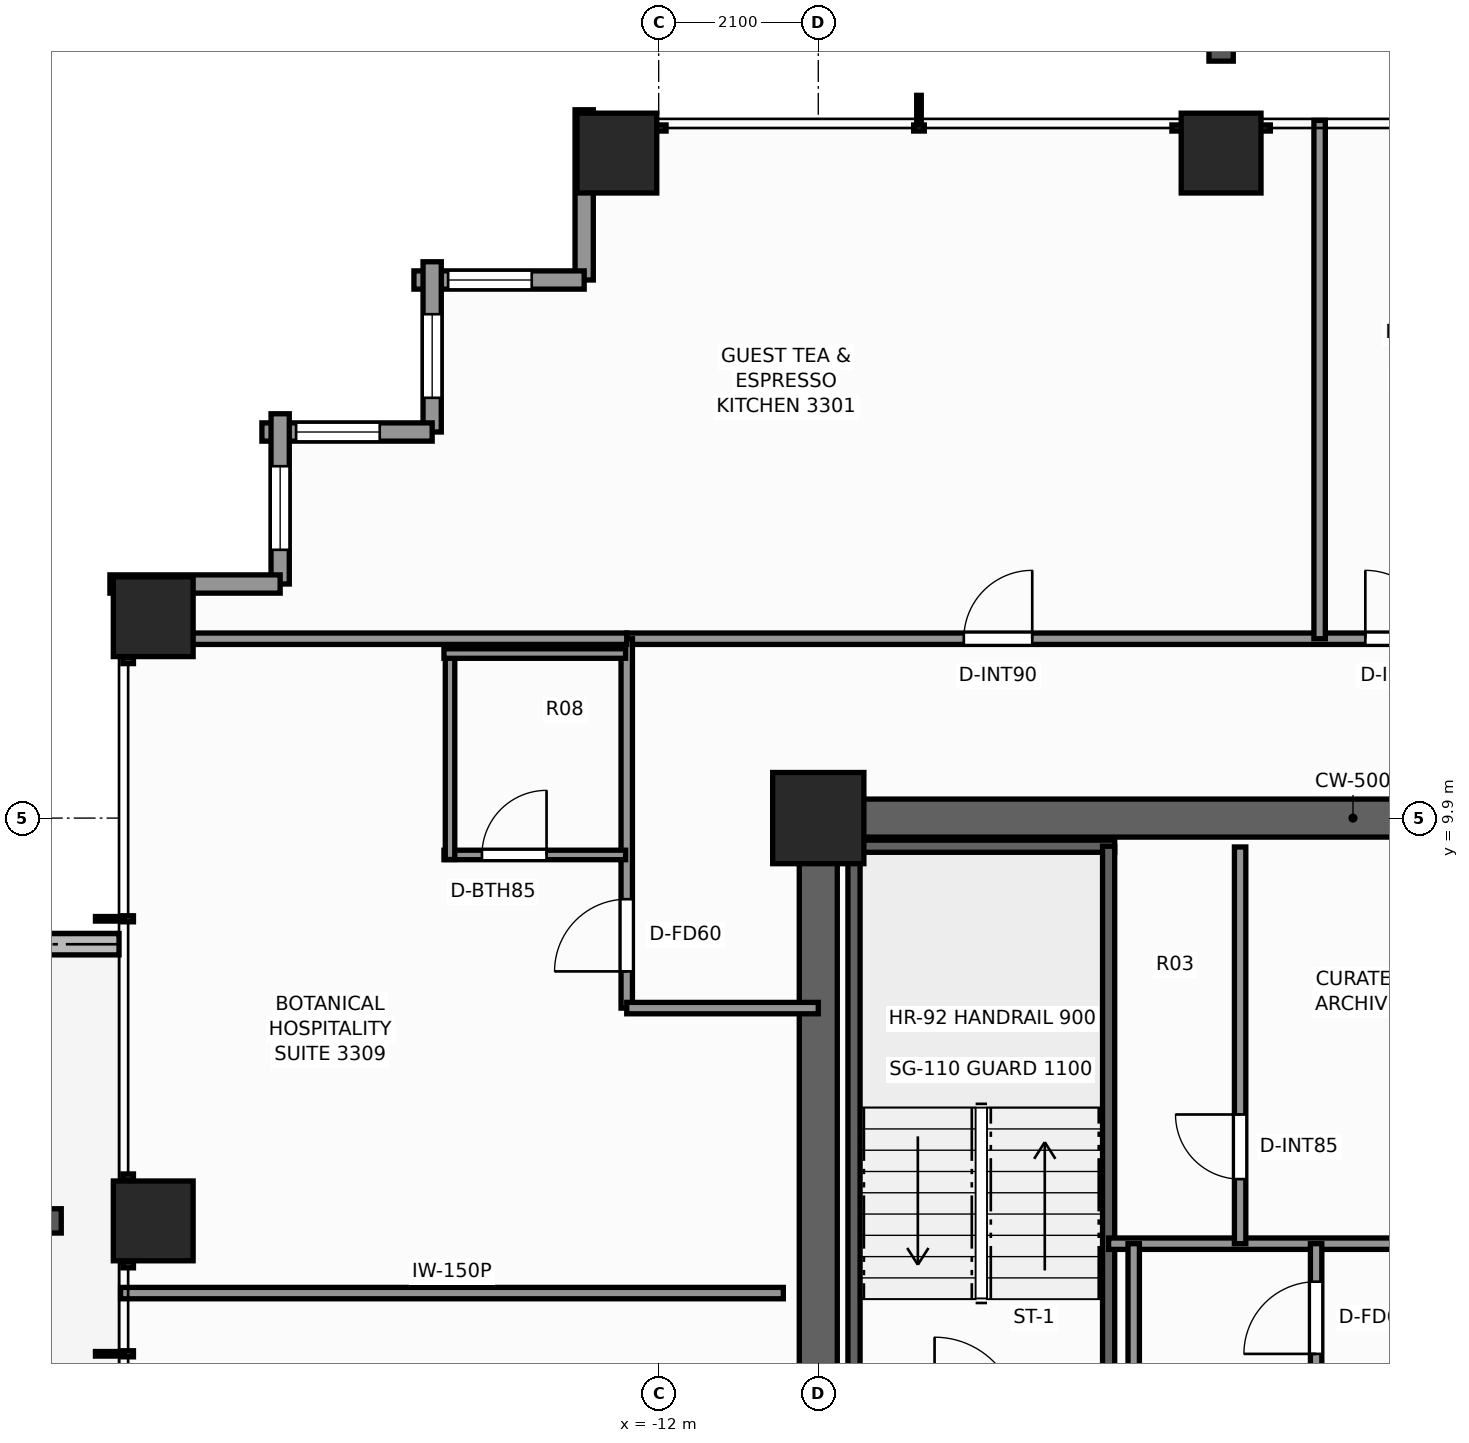
"""IFC4 building model, lengths in metres.
Left out: names, types, materials, properties, quantities, classifications, styles, units other than length and angle.
Written with IfcOpenShell. Run it as: python <this file> out.ifc"""

import sys

from ifc_helpers import new_model, si_unit, direction, frame, frame_2d, origin, origin_2d, place, context, subcontext, project, spatial, rectangle, extrude, element, fill, save


model = new_model("IFC4")
c1 = context("Model", 3, precision=1e-05, world=origin(), true_north=direction((0.0, 1.0)))
c2 = subcontext(c1, "Body", "Model", "MODEL_VIEW")
j1 = project(units=[si_unit("LENGTHUNIT", "METRE"), si_unit("PLANEANGLEUNIT", "RADIAN")], contexts=[c1])
p1 = place(None, origin())
s1 = spatial("IfcSite", under=j1, at=p1, CompositionType="ELEMENT")
p2 = place(p1, origin())
s2 = spatial("IfcBuilding", under=s1, at=p2, CompositionType="ELEMENT")
p3 = place(p2, frame((0.0, 0.0, 115.1)))
s3 = spatial("IfcBuildingStorey", under=s2, at=p3, CompositionType="ELEMENT", Elevation=115.1)
p4 = place(p3, frame((-10.15, 9.9, 0.0), z_axis=(0.0, 0.0, 1.0), x_axis=(1.0, 0.0, 0.0)))
e1 = element("IfcWall", 1, at=p4, inside=s3, PredefinedType="SHEAR", context=c2, shape_type="SweptSolid", body=[
    extrude(rectangle(XDim=14.57, YDim=0.5, at=frame_2d((7.285, 0.0))), origin(), (0.0, 0.0, 1.0), 3.3),
])
p5 = place(p3, frame((-9.9, -3.7, 0.0), z_axis=(0.0, 0.0, 1.0), x_axis=(0.0, 1.0, 0.0)))
e2 = element("IfcWall", 2, at=p5, inside=s3, PredefinedType="SHEAR", context=c2, shape_type="SweptSolid", body=[
    extrude(rectangle(XDim=13.35, YDim=0.5, at=frame_2d((6.675, 0.0))), origin(), (0.0, 0.0, 1.0), 3.3),
])
p6 = place(p5, frame((0.35, 0.0, 0.0)))
e3 = element("IfcOpeningElement", 3, at=p6, cuts=e2, PredefinedType="OPENING", context=c2, shape_type="SweptSolid", body=[
    extrude(rectangle(XDim=1.1, YDim=2.2, at=frame_2d((0.55, 1.1))), frame((0.0, 0.26, 0.0), z_axis=(0.0, -1.0, 0.0), x_axis=(1.0, 0.0, 0.0)), (0.0, 0.0, 1.0), 0.52),
])
p7 = place(p3, frame((-9.9, 9.9, 0.0), z_axis=(0.0, 0.0, 1.0), x_axis=(1.0, 0.0, 0.0)))
e4 = element("IfcColumn", 4, at=p7, inside=s3, PredefinedType="COLUMN", context=c2, shape_type="SweptSolid", body=[
    extrude(rectangle(XDim=1.2, YDim=1.2, at=origin_2d()), origin(), (0.0, 0.0, 1.0), 3.3),
])
for number, where, z_axis, x_axis in (
    (5, (-12.55, 18.65, 0.0), (0.0, 0.0, 1.0), (1.0, 0.0, 0.0)),
    (6, (-4.6, 18.65, 0.0), (0.0, 0.0, 1.0), (1.0, 0.0, 0.0)),
    (7, (-18.65, 4.6, 0.0), (0.0, 0.0, 1.0), (1.0, 0.0, 0.0)),
    (8, (-18.65, 12.55, 0.0), (0.0, 0.0, 1.0), (1.0, 0.0, 0.0)),
):
    element("IfcColumn", number, at=place(p3, frame(where, z_axis=z_axis, x_axis=x_axis)), inside=s3, PredefinedType="COLUMN", context=c2, shape_type="SweptSolid", body=[
        extrude(rectangle(XDim=1.05, YDim=1.05, at=origin_2d()), origin(), (0.0, 0.0, 1.0), 3.3),
    ])
p8 = place(p3, frame((-19.1, 8.24, -0.04), z_axis=(0.0, 0.0, 1.0), x_axis=(-1.0, 0.0, 0.0)))
e9 = element("IfcWall", 9, at=p8, inside=s3, PredefinedType="PARAPET", context=c2, shape_type="SweptSolid", body=[
    extrude(rectangle(XDim=3.214, YDim=0.28, at=frame_2d((1.607, 0.0))), origin(), (0.0, 0.0, 1.0), 0.42),
])
p9 = place(p3, frame((-12.98, 16.98, 0.0), z_axis=(0.0, 0.0, 1.0), x_axis=(0.0, 1.0, 0.0)))
e10 = element("IfcWall", 10, at=p9, inside=s3, PredefinedType="STANDARD", context=c2, shape_type="SweptSolid", body=[
    extrude(rectangle(XDim=2.24, YDim=0.24, at=frame_2d((1.12, 0.0))), origin(), (0.0, 0.0, 1.0), 2.459),
])
p10 = place(p3, frame((-15.22, 16.98, 0.0), z_axis=(0.0, 0.0, 1.0), x_axis=(1.0, 0.0, 0.0)))
e11 = element("IfcWall", 11, at=p10, inside=s3, PredefinedType="STANDARD", context=c2, shape_type="SweptSolid", body=[
    extrude(rectangle(XDim=2.24, YDim=0.24, at=frame_2d((1.12, 0.0))), origin(), (0.0, 0.0, 1.0), 2.459),
])
p11 = place(p10, frame((0.45, 0.0, 0.65)))
e12 = element("IfcOpeningElement", 12, at=p11, cuts=e11, PredefinedType="OPENING", context=c2, shape_type="SweptSolid", body=[
    extrude(rectangle(XDim=1.1, YDim=1.45, at=frame_2d((0.55, 0.725))), frame((0.0, 0.13, 0.0), z_axis=(0.0, -1.0, 0.0), x_axis=(1.0, 0.0, 0.0)), (0.0, 0.0, 1.0), 0.26),
])
p12 = place(p3, frame((-14.98, 14.98, 0.0), z_axis=(0.0, 0.0, 1.0), x_axis=(0.0, 1.0, 0.0)))
e13 = element("IfcWall", 13, at=p12, inside=s3, PredefinedType="STANDARD", context=c2, shape_type="SweptSolid", body=[
    extrude(rectangle(XDim=2.24, YDim=0.24, at=frame_2d((1.12, 0.0))), origin(), (0.0, 0.0, 1.0), 2.459),
])
p13 = place(p12, frame((0.45, 0.0, 0.65)))
e14 = element("IfcOpeningElement", 14, at=p13, cuts=e13, PredefinedType="OPENING", context=c2, shape_type="SweptSolid", body=[
    extrude(rectangle(XDim=1.1, YDim=1.45, at=frame_2d((0.55, 0.725))), frame((0.0, 0.13, 0.0), z_axis=(0.0, -1.0, 0.0), x_axis=(1.0, 0.0, 0.0)), (0.0, 0.0, 1.0), 0.26),
])
p14 = place(p3, frame((-17.22, 14.98, 0.0), z_axis=(0.0, 0.0, 1.0), x_axis=(1.0, 0.0, 0.0)))
e15 = element("IfcWall", 15, at=p14, inside=s3, PredefinedType="STANDARD", context=c2, shape_type="SweptSolid", body=[
    extrude(rectangle(XDim=2.24, YDim=0.24, at=frame_2d((1.12, 0.0))), origin(), (0.0, 0.0, 1.0), 2.459),
])
p15 = place(p14, frame((0.45, 0.0, 0.65)))
e16 = element("IfcOpeningElement", 16, at=p15, cuts=e15, PredefinedType="OPENING", context=c2, shape_type="SweptSolid", body=[
    extrude(rectangle(XDim=1.1, YDim=1.45, at=frame_2d((0.55, 0.725))), frame((0.0, 0.13, 0.0), z_axis=(0.0, -1.0, 0.0), x_axis=(1.0, 0.0, 0.0)), (0.0, 0.0, 1.0), 0.26),
])
p16 = place(p3, frame((-16.98, 12.98, 0.0), z_axis=(0.0, 0.0, 1.0), x_axis=(0.0, 1.0, 0.0)))
e17 = element("IfcWall", 17, at=p16, inside=s3, PredefinedType="STANDARD", context=c2, shape_type="SweptSolid", body=[
    extrude(rectangle(XDim=2.24, YDim=0.24, at=frame_2d((1.12, 0.0))), origin(), (0.0, 0.0, 1.0), 2.459),
])
p17 = place(p16, frame((0.45, 0.0, 0.65)))
e18 = element("IfcOpeningElement", 18, at=p17, cuts=e17, PredefinedType="OPENING", context=c2, shape_type="SweptSolid", body=[
    extrude(rectangle(XDim=1.1, YDim=1.45, at=frame_2d((0.55, 0.725))), frame((0.0, 0.13, 0.0), z_axis=(0.0, -1.0, 0.0), x_axis=(1.0, 0.0, 0.0)), (0.0, 0.0, 1.0), 0.26),
])
p18 = place(p3, frame((-19.22, 12.98, 0.0), z_axis=(0.0, 0.0, 1.0), x_axis=(1.0, 0.0, 0.0)))
e19 = element("IfcWall", 19, at=p18, inside=s3, PredefinedType="STANDARD", context=c2, shape_type="SweptSolid", body=[
    extrude(rectangle(XDim=2.24, YDim=0.24, at=frame_2d((1.12, 0.0))), origin(), (0.0, 0.0, 1.0), 2.459),
])
p19 = place(p3, frame((-9.52, 9.53, 0.0), z_axis=(0.0, 0.0, 1.0), x_axis=(1.0, 0.0, 0.0)))
e20 = element("IfcWall", 20, at=p19, inside=s3, PredefinedType="SHEAR", context=c2, shape_type="SweptSolid", body=[
    extrude(rectangle(XDim=3.52, YDim=0.16, at=frame_2d((1.76, 0.0))), origin(), (0.0, 0.0, 1.0), 3.3),
])
for number, where, z_axis, x_axis in (
    (21, (-9.43, 1.97, 0.0), (0.0, 0.0, 1.0), (0.0, 1.0, 0.0)),
    (22, (-6.08, 1.97, 0.0), (0.0, 0.0, 1.0), (0.0, 1.0, 0.0)),
):
    element("IfcWall", number, at=place(p3, frame(where, z_axis=z_axis, x_axis=x_axis)), inside=s3, PredefinedType="SHEAR", context=c2, shape_type="SweptSolid", body=[
        extrude(rectangle(XDim=7.56, YDim=0.16, at=frame_2d((3.78, 0.0))), origin(), (0.0, 0.0, 1.0), 3.3),
    ])
p20 = place(p3, frame((-6.08, 4.3, 0.0), z_axis=(0.0, 0.0, 1.0), x_axis=(1.0, 0.0, 0.0)))
e23 = element("IfcWall", 23, at=p20, inside=s3, PredefinedType="PARTITIONING", context=c2, shape_type="SweptSolid", body=[
    extrude(rectangle(XDim=6.3, YDim=0.15, at=frame_2d((3.15, 0.0))), origin(), (0.0, 0.0, 1.0), 3.08),
])
p21 = place(p3, frame((-4.35, 4.3, 0.0), z_axis=(0.0, 0.0, 1.0), x_axis=(0.0, 1.0, 0.0)))
e24 = element("IfcWall", 24, at=p21, inside=s3, PredefinedType="PARTITIONING", context=c2, shape_type="SweptSolid", body=[
    extrude(rectangle(XDim=5.22, YDim=0.15, at=frame_2d((2.61, 0.0))), origin(), (0.0, 0.0, 1.0), 3.08),
])
p22 = place(p21, frame((0.85, 0.0, 0.0)))
e25 = element("IfcOpeningElement", 25, at=p22, cuts=e24, PredefinedType="OPENING", context=c2, shape_type="SweptSolid", body=[
    extrude(rectangle(XDim=0.85, YDim=2.03, at=frame_2d((0.425, 1.015))), frame((0.0, 0.085, 0.0), z_axis=(0.0, -1.0, 0.0), x_axis=(1.0, 0.0, 0.0)), (0.0, 0.0, 1.0), 0.17),
])
p23 = place(p3, frame((-3.35, 1.1, 0.0), z_axis=(0.0, 0.0, 1.0), x_axis=(0.0, 1.0, 0.0)))
e26 = element("IfcWall", 26, at=p23, inside=s3, PredefinedType="PARTITIONING", context=c2, shape_type="SweptSolid", body=[
    extrude(rectangle(XDim=3.2, YDim=0.15, at=frame_2d((1.6, 0.0))), origin(), (0.0, 0.0, 1.0), 2.715),
])
p24 = place(p23, frame((1.75, 0.0, 0.0)))
e27 = element("IfcOpeningElement", 27, at=p24, cuts=e26, PredefinedType="OPENING", context=c2, shape_type="SweptSolid", body=[
    extrude(rectangle(XDim=0.95, YDim=2.06, at=frame_2d((0.475, 1.03))), frame((0.0, 0.085, 0.0), z_axis=(0.0, -1.0, 0.0), x_axis=(1.0, 0.0, 0.0)), (0.0, 0.0, 1.0), 0.17),
])
p25 = place(p3, frame((-5.75, 1.97, 0.0), z_axis=(0.0, 0.0, 1.0), x_axis=(0.0, 1.0, 0.0)))
e28 = element("IfcWall", 28, at=p25, inside=s3, PredefinedType="PARTITIONING", context=c2, shape_type="SweptSolid", body=[
    extrude(rectangle(XDim=2.33, YDim=0.15, at=frame_2d((1.165, 0.0))), origin(), (0.0, 0.0, 1.0), 2.715),
])
p26 = place(p3, frame((-12.42, 12.26, 0.0), z_axis=(0.0, 0.0, 1.0), x_axis=(1.0, 0.0, 0.0)))
e29 = element("IfcWall", 29, at=p26, inside=s3, PredefinedType="PARTITIONING", context=c2, shape_type="SweptSolid", body=[
    extrude(rectangle(XDim=24.68, YDim=0.15, at=frame_2d((12.34, 0.0))), origin(), (0.0, 0.0, 1.0), 2.292),
])
p27 = place(p26, frame((4.435, 0.0, 0.0)))
e30 = element("IfcOpeningElement", 30, at=p27, cuts=e29, PredefinedType="OPENING", context=c2, shape_type="SweptSolid", body=[
    extrude(rectangle(XDim=0.9, YDim=2.06, at=frame_2d((0.45, 1.03))), frame((0.0, 0.085, 0.0), z_axis=(0.0, -1.0, 0.0), x_axis=(1.0, 0.0, 0.0)), (0.0, 0.0, 1.0), 0.17),
])
p28 = place(p26, frame((9.718, 0.0, 0.0)))
e31 = element("IfcOpeningElement", 31, at=p28, cuts=e29, PredefinedType="OPENING", context=c2, shape_type="SweptSolid", body=[
    extrude(rectangle(XDim=0.9, YDim=2.06, at=frame_2d((0.45, 1.03))), frame((0.0, 0.085, 0.0), z_axis=(0.0, -1.0, 0.0), x_axis=(1.0, 0.0, 0.0)), (0.0, 0.0, 1.0), 0.17),
])
p29 = place(p26, frame((13.516, 0.0, 0.0)))
e32 = element("IfcOpeningElement", 32, at=p29, cuts=e29, PredefinedType="OPENING", context=c2, shape_type="SweptSolid", body=[
    extrude(rectangle(XDim=0.95, YDim=2.06, at=frame_2d((0.475, 1.03))), frame((0.0, 0.085, 0.0), z_axis=(0.0, -1.0, 0.0), x_axis=(1.0, 0.0, 0.0)), (0.0, 0.0, 1.0), 0.17),
])
p30 = place(p26, frame((18.772, 0.0, 0.0)))
e33 = element("IfcOpeningElement", 33, at=p30, cuts=e29, PredefinedType="OPENING", context=c2, shape_type="SweptSolid", body=[
    extrude(rectangle(XDim=0.9, YDim=2.06, at=frame_2d((0.45, 1.03))), frame((0.0, 0.085, 0.0), z_axis=(0.0, -1.0, 0.0), x_axis=(1.0, 0.0, 0.0)), (0.0, 0.0, 1.0), 0.17),
])
p31 = place(p26, frame((21.107, 0.0, 0.0)))
e34 = element("IfcOpeningElement", 34, at=p31, cuts=e29, PredefinedType="OPENING", context=c2, shape_type="SweptSolid", body=[
    extrude(rectangle(XDim=0.9, YDim=2.06, at=frame_2d((0.45, 1.03))), frame((0.0, 0.085, 0.0), z_axis=(0.0, -1.0, 0.0), x_axis=(1.0, 0.0, 0.0)), (0.0, 0.0, 1.0), 0.17),
])
p32 = place(p3, frame((-12.42, 7.4, 0.0), z_axis=(0.0, 0.0, 1.0), x_axis=(0.0, 1.0, 0.0)))
e35 = element("IfcWall", 35, at=p32, inside=s3, PredefinedType="PARTITIONING", context=c2, shape_type="SweptSolid", body=[
    extrude(rectangle(XDim=4.86, YDim=0.15, at=frame_2d((2.43, 0.0))), origin(), (0.0, 0.0, 1.0), 2.292),
])
p33 = place(p32, frame((0.483, 0.0, 0.0)))
e36 = element("IfcOpeningElement", 36, at=p33, cuts=e35, PredefinedType="OPENING", context=c2, shape_type="SweptSolid", body=[
    extrude(rectangle(XDim=0.95, YDim=2.06, at=frame_2d((0.475, 1.03))), frame((0.0, 0.085, 0.0), z_axis=(0.0, -1.0, 0.0), x_axis=(1.0, 0.0, 0.0)), (0.0, 0.0, 1.0), 0.17),
])
p34 = place(p3, frame((-12.42, 7.4, 0.0), z_axis=(0.0, 0.0, 1.0), x_axis=(1.0, 0.0, 0.0)))
e37 = element("IfcWall", 37, at=p34, inside=s3, PredefinedType="PARTITIONING", context=c2, shape_type="SweptSolid", body=[
    extrude(rectangle(XDim=2.52, YDim=0.15, at=frame_2d((1.26, 0.0))), origin(), (0.0, 0.0, 1.0), 3.08),
])
p35 = place(p3, frame((-19.08, 12.26, 0.0), z_axis=(0.0, 0.0, 1.0), x_axis=(1.0, 0.0, 0.0)))
e38 = element("IfcWall", 38, at=p35, inside=s3, PredefinedType="PARTITIONING", context=c2, shape_type="SweptSolid", body=[
    extrude(rectangle(XDim=6.66, YDim=0.15, at=frame_2d((3.33, 0.0))), origin(), (0.0, 0.0, 1.0), 2.292),
])
p36 = place(p3, frame((-3.304, 12.26, 0.0), z_axis=(0.0, 0.0, 1.0), x_axis=(0.0, 1.0, 0.0)))
e39 = element("IfcWall", 39, at=p36, inside=s3, PredefinedType="PARTITIONING", context=c2, shape_type="SweptSolid", body=[
    extrude(rectangle(XDim=6.82, YDim=0.15, at=frame_2d((3.41, 0.0))), origin(), (0.0, 0.0, 1.0), 2.369),
])
p37 = place(p3, frame((-19.08, 3.65, 0.0), z_axis=(0.0, 0.0, 1.0), x_axis=(1.0, 0.0, 0.0)))
e40 = element("IfcWall", 40, at=p37, inside=s3, PredefinedType="PARTITIONING", context=c2, shape_type="SweptSolid", body=[
    extrude(rectangle(XDim=8.72, YDim=0.15, at=frame_2d((4.36, 0.0))), origin(), (0.0, 0.0, 1.0), 2.449),
])
p38 = place(p3, frame((-14.825, 9.415, 0.0), z_axis=(0.0, 0.0, 1.0), x_axis=(1.0, 0.0, 0.0)))
e41 = element("IfcWall", 41, at=p38, inside=s3, PredefinedType="PARTITIONING", context=c2, shape_type="SweptSolid", body=[
    extrude(rectangle(XDim=2.39, YDim=0.125, at=frame_2d((1.195, 0.0))), origin(), (0.0, 0.0, 1.0), 3.08),
])
p39 = place(p38, frame((0.5, 0.0, 0.0)))
e42 = element("IfcOpeningElement", 42, at=p39, cuts=e41, PredefinedType="OPENING", context=c2, shape_type="SweptSolid", body=[
    extrude(rectangle(XDim=0.85, YDim=2.03, at=frame_2d((0.425, 1.015))), frame((0.0, 0.073, 0.0), z_axis=(0.0, -1.0, 0.0), x_axis=(1.0, 0.0, 0.0)), (0.0, 0.0, 1.0), 0.145),
])
p40 = place(p3, frame((-14.745, 9.355, 0.0), z_axis=(0.0, 0.0, 1.0), x_axis=(0.0, 1.0, 0.0)))
e43 = element("IfcWall", 43, at=p40, inside=s3, PredefinedType="PARTITIONING", context=c2, shape_type="SweptSolid", body=[
    extrude(rectangle(XDim=2.77, YDim=0.125, at=frame_2d((1.385, 0.0))), origin(), (0.0, 0.0, 1.0), 2.292),
])
p41 = place(p3, frame((-14.825, 12.065, 0.0), z_axis=(0.0, 0.0, 1.0), x_axis=(1.0, 0.0, 0.0)))
e44 = element("IfcWall", 44, at=p41, inside=s3, PredefinedType="PARTITIONING", context=c2, shape_type="SweptSolid", body=[
    extrude(rectangle(XDim=2.39, YDim=0.125, at=frame_2d((1.195, 0.0))), origin(), (0.0, 0.0, 1.0), 3.08),
])
p42 = place(p11, origin())
e45 = element("IfcWindow", 45, at=p42, inside=s3, PartitioningType="SINGLE_PANEL", PredefinedType="WINDOW", context=c2, shape_type="SweptSolid", body=[
    extrude(rectangle(XDim=1.1, YDim=1.45, at=frame_2d((0.55, 0.725))), frame((0.0, 0.03, 0.0), z_axis=(0.0, -1.0, 0.0), x_axis=(1.0, 0.0, 0.0)), (0.0, 0.0, 1.0), 0.06),
])
fill(e12, e45)
p43 = place(p13, origin())
e46 = element("IfcWindow", 46, at=p43, inside=s3, PartitioningType="SINGLE_PANEL", PredefinedType="WINDOW", context=c2, shape_type="SweptSolid", body=[
    extrude(rectangle(XDim=1.1, YDim=1.45, at=frame_2d((0.55, 0.725))), frame((0.0, 0.03, 0.0), z_axis=(0.0, -1.0, 0.0), x_axis=(1.0, 0.0, 0.0)), (0.0, 0.0, 1.0), 0.06),
])
fill(e14, e46)
p44 = place(p15, origin())
e47 = element("IfcWindow", 47, at=p44, inside=s3, PartitioningType="SINGLE_PANEL", PredefinedType="WINDOW", context=c2, shape_type="SweptSolid", body=[
    extrude(rectangle(XDim=1.1, YDim=1.45, at=frame_2d((0.55, 0.725))), frame((0.0, 0.03, 0.0), z_axis=(0.0, -1.0, 0.0), x_axis=(1.0, 0.0, 0.0)), (0.0, 0.0, 1.0), 0.06),
])
fill(e16, e47)
p45 = place(p17, origin())
e48 = element("IfcWindow", 48, at=p45, inside=s3, PartitioningType="SINGLE_PANEL", PredefinedType="WINDOW", context=c2, shape_type="SweptSolid", body=[
    extrude(rectangle(XDim=1.1, YDim=1.45, at=frame_2d((0.55, 0.725))), frame((0.0, 0.03, 0.0), z_axis=(0.0, -1.0, 0.0), x_axis=(1.0, 0.0, 0.0)), (0.0, 0.0, 1.0), 0.06),
])
fill(e18, e48)
p46 = place(p22, origin())
e49 = element("IfcDoor", 49, at=p46, inside=s3, OperationType="SINGLE_SWING_RIGHT", PredefinedType="DOOR", context=c2, shape_type="SweptSolid", body=[
    extrude(rectangle(XDim=0.85, YDim=2.03, at=frame_2d((0.425, 1.015))), frame((0.0, 0.025, 0.0), z_axis=(0.0, -1.0, 0.0), x_axis=(1.0, 0.0, 0.0)), (0.0, 0.0, 1.0), 0.05),
])
fill(e25, e49)
p47 = place(p24, origin())
e50 = element("IfcDoor", 50, at=p47, inside=s3, OperationType="SINGLE_SWING_LEFT", PredefinedType="DOOR", context=c2, shape_type="SweptSolid", body=[
    extrude(rectangle(XDim=0.95, YDim=2.06, at=frame_2d((0.475, 1.03))), frame((0.0, 0.025, 0.0), z_axis=(0.0, -1.0, 0.0), x_axis=(1.0, 0.0, 0.0)), (0.0, 0.0, 1.0), 0.05),
])
fill(e27, e50)
p48 = place(p27, origin())
e51 = element("IfcDoor", 51, at=p48, inside=s3, OperationType="SINGLE_SWING_RIGHT", PredefinedType="DOOR", context=c2, shape_type="SweptSolid", body=[
    extrude(rectangle(XDim=0.9, YDim=2.06, at=frame_2d((0.45, 1.03))), frame((0.0, 0.025, 0.0), z_axis=(0.0, -1.0, 0.0), x_axis=(1.0, 0.0, 0.0)), (0.0, 0.0, 1.0), 0.05),
])
fill(e30, e51)
p49 = place(p28, origin())
e52 = element("IfcDoor", 52, at=p49, inside=s3, OperationType="SINGLE_SWING_LEFT", PredefinedType="DOOR", context=c2, shape_type="SweptSolid", body=[
    extrude(rectangle(XDim=0.9, YDim=2.06, at=frame_2d((0.45, 1.03))), frame((0.0, 0.025, 0.0), z_axis=(0.0, -1.0, 0.0), x_axis=(1.0, 0.0, 0.0)), (0.0, 0.0, 1.0), 0.05),
])
fill(e31, e52)
p50 = place(p39, origin())
e53 = element("IfcDoor", 53, at=p50, inside=s3, OperationType="SINGLE_SWING_RIGHT", PredefinedType="DOOR", context=c2, shape_type="SweptSolid", body=[
    extrude(rectangle(XDim=0.85, YDim=2.03, at=frame_2d((0.425, 1.015))), frame((0.0, 0.025, 0.0), z_axis=(0.0, -1.0, 0.0), x_axis=(1.0, 0.0, 0.0)), (0.0, 0.0, 1.0), 0.05),
])
fill(e42, e53)
p51 = place(p33, origin())
e54 = element("IfcDoor", 54, at=p51, inside=s3, OperationType="SINGLE_SWING_LEFT", PredefinedType="DOOR", context=c2, shape_type="SweptSolid", body=[
    extrude(rectangle(XDim=0.95, YDim=2.06, at=frame_2d((0.475, 1.03))), frame((0.0, 0.025, 0.0), z_axis=(0.0, -1.0, 0.0), x_axis=(1.0, 0.0, 0.0)), (0.0, 0.0, 1.0), 0.05),
])
fill(e36, e54)
save(model, sys.argv[1])
